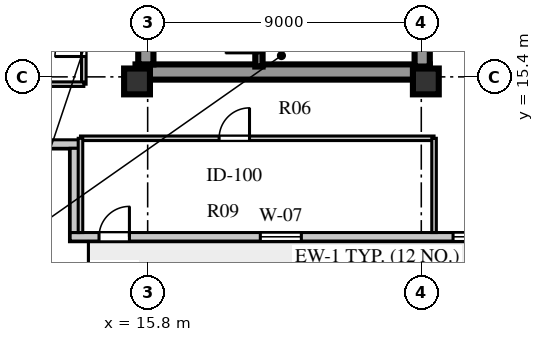
"""IFC4 building model, lengths in metres.
Left out: names, types, materials, properties, quantities, classifications, styles, units other than length and angle.
Written with IfcOpenShell. Run it as: python <this file> out.ifc"""

import sys

from ifc_helpers import new_model, si_unit, direction, frame, frame_2d, origin, origin_2d, place, context, subcontext, project, spatial, rectangle, extrude, element, fill, save


model = new_model("IFC4")
c1 = context("Model", 3, precision=1e-05, world=origin(), true_north=direction((0.0, 1.0)))
c2 = subcontext(c1, "Body", "Model", "MODEL_VIEW")
j1 = project(units=[si_unit("LENGTHUNIT", "METRE"), si_unit("PLANEANGLEUNIT", "RADIAN")], contexts=[c1])
p1 = place(None, origin())
s1 = spatial("IfcSite", under=j1, at=p1, CompositionType="ELEMENT")
p2 = place(p1, origin())
s2 = spatial("IfcBuilding", under=s1, at=p2, CompositionType="ELEMENT")
p3 = place(p2, frame((0.0, 0.0, 134.8)))
s3 = spatial("IfcBuildingStorey", under=s2, at=p3, CompositionType="ELEMENT", Elevation=134.8)
p4 = place(p3, frame((15.4, 15.56, 0.0), z_axis=(0.0, 0.0, 1.0), x_axis=(1.0, 0.0, 0.0)))
e1 = element("IfcWall", 1, at=p4, inside=s3, PredefinedType="SHEAR", context=c2, shape_type="SweptSolid", body=[
    extrude(rectangle(XDim=9.68, YDim=0.5, at=frame_2d((4.84, 0.0))), origin(), (0.0, 0.0, 1.0), 3.6),
])
p5 = place(p3, frame((15.74, 15.81, 0.0), z_axis=(0.0, 0.0, 1.0), x_axis=(0.0, 1.0, 0.0)))
e2 = element("IfcWall", 2, at=p5, inside=s3, PredefinedType="SHEAR", context=c2, shape_type="SweptSolid", body=[
    extrude(rectangle(XDim=25.63, YDim=0.5, at=frame_2d((12.815, 0.0))), origin(), (0.0, 0.0, 1.0), 3.6),
])
p6 = place(p3, frame((24.83, 15.74, 0.0), z_axis=(0.0, 0.0, 1.0), x_axis=(0.0, 1.0, 0.0)))
e3 = element("IfcWall", 3, at=p6, inside=s3, PredefinedType="SHEAR", context=c2, shape_type="SweptSolid", body=[
    extrude(rectangle(XDim=25.76, YDim=0.5, at=frame_2d((12.88, 0.0))), origin(), (0.0, 0.0, 1.0), 3.6),
])
p7 = place(p6, frame((1.61, 0.0, 0.0)))
e4 = element("IfcOpeningElement", 4, at=p7, cuts=e3, PredefinedType="OPENING", context=c2, shape_type="SweptSolid", body=[
    extrude(rectangle(XDim=1.2, YDim=2.1, at=frame_2d((0.6, 1.05))), frame((0.0, 0.26, 0.0), z_axis=(0.0, -1.0, 0.0), x_axis=(1.0, 0.0, 0.0)), (0.0, 0.0, 1.0), 0.52),
])
p8 = place(p6, frame((6.78, 0.0, 0.0)))
e5 = element("IfcOpeningElement", 5, at=p8, cuts=e3, PredefinedType="OPENING", context=c2, shape_type="SweptSolid", body=[
    extrude(rectangle(XDim=0.85, YDim=2.06, at=frame_2d((0.425, 1.03))), frame((0.0, 0.26, 0.0), z_axis=(0.0, -1.0, 0.0), x_axis=(1.0, 0.0, 0.0)), (0.0, 0.0, 1.0), 0.52),
])
p9 = place(p6, frame((12.11, 0.0, 0.0)))
e6 = element("IfcOpeningElement", 6, at=p9, cuts=e3, PredefinedType="OPENING", context=c2, shape_type="SweptSolid", body=[
    extrude(rectangle(XDim=1.5, YDim=2.12, at=frame_2d((0.75, 1.06))), frame((0.0, 0.26, 0.0), z_axis=(0.0, -1.0, 0.0), x_axis=(1.0, 0.0, 0.0)), (0.0, 0.0, 1.0), 0.52),
])
p10 = place(p6, frame((20.11, 0.0, 0.0)))
e7 = element("IfcOpeningElement", 7, at=p10, cuts=e3, PredefinedType="OPENING", context=c2, shape_type="SweptSolid", body=[
    extrude(rectangle(XDim=1.2, YDim=2.12, at=frame_2d((0.6, 1.06))), frame((0.0, 0.26, 0.0), z_axis=(0.0, -1.0, 0.0), x_axis=(1.0, 0.0, 0.0)), (0.0, 0.0, 1.0), 0.52),
])
p11 = place(p6, frame((24.01, 0.0, 0.0)))
e8 = element("IfcOpeningElement", 8, at=p11, cuts=e3, PredefinedType="OPENING", context=c2, shape_type="SweptSolid", body=[
    extrude(rectangle(XDim=0.95, YDim=2.1, at=frame_2d((0.475, 1.05))), frame((0.0, 0.26, 0.0), z_axis=(0.0, -1.0, 0.0), x_axis=(1.0, 0.0, 0.0)), (0.0, 0.0, 1.0), 0.52),
])
for number, where, z_axis, x_axis in (
    (9, (15.45, 15.25, 0.0), (0.0, 0.0, 1.0), (1.0, 0.0, 0.0)),
    (10, (24.95, 15.25, 0.0), (0.0, 0.0, 1.0), (1.0, 0.0, 0.0)),
):
    element("IfcColumn", number, at=place(p3, frame(where, z_axis=z_axis, x_axis=x_axis)), inside=s3, PredefinedType="COLUMN", context=c2, shape_type="SweptSolid", body=[
        extrude(rectangle(XDim=0.85, YDim=0.85, at=origin_2d()), origin(), (0.0, 0.0, 1.0), 3.6),
    ])
p12 = place(p3, frame((13.25, 10.14, 0.0), z_axis=(0.0, 0.0, 1.0), x_axis=(1.0, 0.0, 0.0)))
e11 = element("IfcWall", 11, at=p12, inside=s3, PredefinedType="STANDARD", context=c2, shape_type="SweptSolid", body=[
    extrude(rectangle(XDim=32.1, YDim=0.28, at=frame_2d((16.05, 0.0))), origin(), (0.0, 0.0, 1.0), 3.6),
])
p13 = place(p12, frame((0.95, 0.0, 0.0)))
e12 = element("IfcOpeningElement", 12, at=p13, cuts=e11, PredefinedType="OPENING", context=c2, shape_type="SweptSolid", body=[
    extrude(rectangle(XDim=1.0, YDim=2.05, at=frame_2d((0.5, 1.025))), frame((0.0, 0.15, 0.0), z_axis=(0.0, -1.0, 0.0), x_axis=(1.0, 0.0, 0.0)), (0.0, 0.0, 1.0), 0.3),
])
p14 = place(p12, frame((6.255, 0.0, 0.8)))
e13 = element("IfcOpeningElement", 13, at=p14, cuts=e11, PredefinedType="OPENING", context=c2, shape_type="SweptSolid", body=[
    extrude(rectangle(XDim=1.35, YDim=1.9, at=frame_2d((0.675, 0.95))), frame((0.0, 0.15, 0.0), z_axis=(0.0, -1.0, 0.0), x_axis=(1.0, 0.0, 0.0)), (0.0, 0.0, 1.0), 0.3),
])
p15 = place(p12, frame((12.595, 0.0, 0.8)))
e14 = element("IfcOpeningElement", 14, at=p15, cuts=e11, PredefinedType="OPENING", context=c2, shape_type="SweptSolid", body=[
    extrude(rectangle(XDim=1.2, YDim=1.75, at=frame_2d((0.6, 0.875))), frame((0.0, 0.15, 0.0), z_axis=(0.0, -1.0, 0.0), x_axis=(1.0, 0.0, 0.0)), (0.0, 0.0, 1.0), 0.3),
])
p16 = place(p12, frame((14.885, 0.0, 0.8)))
e15 = element("IfcOpeningElement", 15, at=p16, cuts=e11, PredefinedType="OPENING", context=c2, shape_type="SweptSolid", body=[
    extrude(rectangle(XDim=1.2, YDim=1.75, at=frame_2d((0.6, 0.875))), frame((0.0, 0.15, 0.0), z_axis=(0.0, -1.0, 0.0), x_axis=(1.0, 0.0, 0.0)), (0.0, 0.0, 1.0), 0.3),
])
p17 = place(p12, frame((17.16, 0.0, 0.8)))
e16 = element("IfcOpeningElement", 16, at=p17, cuts=e11, PredefinedType="OPENING", context=c2, shape_type="SweptSolid", body=[
    extrude(rectangle(XDim=2.25, YDim=2.0, at=frame_2d((1.125, 1.0))), frame((0.0, 0.15, 0.0), z_axis=(0.0, -1.0, 0.0), x_axis=(1.0, 0.0, 0.0)), (0.0, 0.0, 1.0), 0.3),
])
p18 = place(p12, frame((20.485, 0.0, 0.8)))
e17 = element("IfcOpeningElement", 17, at=p18, cuts=e11, PredefinedType="OPENING", context=c2, shape_type="SweptSolid", body=[
    extrude(rectangle(XDim=1.2, YDim=1.75, at=frame_2d((0.6, 0.875))), frame((0.0, 0.15, 0.0), z_axis=(0.0, -1.0, 0.0), x_axis=(1.0, 0.0, 0.0)), (0.0, 0.0, 1.0), 0.3),
])
p19 = place(p12, frame((23.005, 0.0, 0.8)))
e18 = element("IfcOpeningElement", 18, at=p19, cuts=e11, PredefinedType="OPENING", context=c2, shape_type="SweptSolid", body=[
    extrude(rectangle(XDim=1.5, YDim=2.0, at=frame_2d((0.75, 1.0))), frame((0.0, 0.15, 0.0), z_axis=(0.0, -1.0, 0.0), x_axis=(1.0, 0.0, 0.0)), (0.0, 0.0, 1.0), 0.3),
])
p20 = place(p12, frame((25.865, 0.0, 0.8)))
e19 = element("IfcOpeningElement", 19, at=p20, cuts=e11, PredefinedType="OPENING", context=c2, shape_type="SweptSolid", body=[
    extrude(rectangle(XDim=1.2, YDim=1.75, at=frame_2d((0.6, 0.875))), frame((0.0, 0.15, 0.0), z_axis=(0.0, -1.0, 0.0), x_axis=(1.0, 0.0, 0.0)), (0.0, 0.0, 1.0), 0.3),
])
p21 = place(p12, frame((28.58, 0.0, 0.8)))
e20 = element("IfcOpeningElement", 20, at=p21, cuts=e11, PredefinedType="OPENING", context=c2, shape_type="SweptSolid", body=[
    extrude(rectangle(XDim=2.4, YDim=2.05, at=frame_2d((1.2, 1.025))), frame((0.0, 0.15, 0.0), z_axis=(0.0, -1.0, 0.0), x_axis=(1.0, 0.0, 0.0)), (0.0, 0.0, 1.0), 0.3),
])
p22 = place(p3, frame((10.2, 13.19, 0.0), z_axis=(0.0, 0.0, 1.0), x_axis=(1.0, 0.0, 0.0)))
e21 = element("IfcWall", 21, at=p22, inside=s3, PredefinedType="STANDARD", context=c2, shape_type="SweptSolid", body=[
    extrude(rectangle(XDim=3.33, YDim=0.28, at=frame_2d((1.665, 0.0))), origin(), (0.0, 0.0, 1.0), 3.6),
])
p23 = place(p3, frame((13.39, 13.05, 0.0), z_axis=(0.0, 0.0, 1.0), x_axis=(0.0, -1.0, 0.0)))
e22 = element("IfcWall", 22, at=p23, inside=s3, PredefinedType="STANDARD", context=c2, shape_type="SweptSolid", body=[
    extrude(rectangle(XDim=2.77, YDim=0.28, at=frame_2d((1.385, 0.0))), origin(), (0.0, 0.0, 1.0), 3.6),
])
p24 = place(p3, frame((19.46, 15.74, 0.0), z_axis=(0.0, 0.0, 1.0), x_axis=(0.0, 1.0, 0.0)))
e23 = element("IfcWall", 23, at=p24, inside=s3, PredefinedType="SHEAR", context=c2, shape_type="SweptSolid", body=[
    extrude(rectangle(XDim=8.2, YDim=0.24, at=frame_2d((4.1, 0.0))), origin(), (0.0, 0.0, 1.0), 3.85),
])
p25 = place(p24, frame((0.45, 0.0, 0.0)))
e24 = element("IfcOpeningElement", 24, at=p25, cuts=e23, PredefinedType="OPENING", context=c2, shape_type="SweptSolid", body=[
    extrude(rectangle(XDim=1.1, YDim=2.1, at=frame_2d((0.55, 1.05))), frame((0.0, 0.13, 0.0), z_axis=(0.0, -1.0, 0.0), x_axis=(1.0, 0.0, 0.0)), (0.0, 0.0, 1.0), 0.26),
])
p26 = place(p3, frame((13.7, 15.16, 0.0), z_axis=(0.0, 0.0, 1.0), x_axis=(0.0, 1.0, 0.0)))
e25 = element("IfcWall", 25, at=p26, inside=s3, PredefinedType="PARTITIONING", context=c2, shape_type="SweptSolid", body=[
    extrude(rectangle(XDim=26.88, YDim=0.15, at=frame_2d((13.44, 0.0))), origin(), (0.0, 0.0, 1.0), 3.6),
])
p27 = place(p26, frame((0.91, 0.0, 0.0)))
e26 = element("IfcOpeningElement", 26, at=p27, cuts=e25, PredefinedType="OPENING", context=c2, shape_type="SweptSolid", body=[
    extrude(rectangle(XDim=0.95, YDim=2.1, at=frame_2d((0.475, 1.05))), frame((0.0, 0.085, 0.0), z_axis=(0.0, -1.0, 0.0), x_axis=(1.0, 0.0, 0.0)), (0.0, 0.0, 1.0), 0.17),
])
p28 = place(p26, frame((9.69, 0.0, 0.0)))
e27 = element("IfcOpeningElement", 27, at=p28, cuts=e25, PredefinedType="OPENING", context=c2, shape_type="SweptSolid", body=[
    extrude(rectangle(XDim=0.95, YDim=2.1, at=frame_2d((0.475, 1.05))), frame((0.0, 0.085, 0.0), z_axis=(0.0, -1.0, 0.0), x_axis=(1.0, 0.0, 0.0)), (0.0, 0.0, 1.0), 0.17),
])
p29 = place(p26, frame((18.49, 0.0, 0.0)))
e28 = element("IfcOpeningElement", 28, at=p29, cuts=e25, PredefinedType="OPENING", context=c2, shape_type="SweptSolid", body=[
    extrude(rectangle(XDim=0.95, YDim=2.1, at=frame_2d((0.475, 1.05))), frame((0.0, 0.085, 0.0), z_axis=(0.0, -1.0, 0.0), x_axis=(1.0, 0.0, 0.0)), (0.0, 0.0, 1.0), 0.17),
])
p30 = place(p3, frame((10.48, 15.16, 0.0), z_axis=(0.0, 0.0, 1.0), x_axis=(1.0, 0.0, 0.0)))
e29 = element("IfcWall", 29, at=p30, inside=s3, PredefinedType="PARTITIONING", context=c2, shape_type="SweptSolid", body=[
    extrude(rectangle(XDim=3.22, YDim=0.15, at=frame_2d((1.61, 0.0))), origin(), (0.0, 0.0, 1.0), 3.1),
])
p31 = place(p3, frame((13.59, 13.38, 0.0), z_axis=(0.0, 0.0, 1.0), x_axis=(1.0, 0.0, 0.0)))
e30 = element("IfcWall", 30, at=p31, inside=s3, PredefinedType="PARTITIONING", context=c2, shape_type="SweptSolid", body=[
    extrude(rectangle(XDim=11.63, YDim=0.15, at=frame_2d((5.815, 0.0))), origin(), (0.0, 0.0, 1.0), 3.6),
])
p32 = place(p31, frame((4.56, 0.0, 0.0)))
e31 = element("IfcOpeningElement", 31, at=p32, cuts=e30, PredefinedType="OPENING", context=c2, shape_type="SweptSolid", body=[
    extrude(rectangle(XDim=1.0, YDim=2.08, at=frame_2d((0.5, 1.04))), frame((0.0, 0.085, 0.0), z_axis=(0.0, -1.0, 0.0), x_axis=(1.0, 0.0, 0.0)), (0.0, 0.0, 1.0), 0.17),
])
p33 = place(p3, frame((13.59, 10.28, 0.0), z_axis=(0.0, 0.0, 1.0), x_axis=(0.0, 1.0, 0.0)))
e32 = element("IfcWall", 32, at=p33, inside=s3, PredefinedType="PARTITIONING", context=c2, shape_type="SweptSolid", body=[
    extrude(rectangle(XDim=3.1, YDim=0.15, at=frame_2d((1.55, 0.0))), origin(), (0.0, 0.0, 1.0), 3.6),
])
p34 = place(p3, frame((25.22, 10.28, 0.0), z_axis=(0.0, 0.0, 1.0), x_axis=(0.0, 1.0, 0.0)))
e33 = element("IfcWall", 33, at=p34, inside=s3, PredefinedType="PARTITIONING", context=c2, shape_type="SweptSolid", body=[
    extrude(rectangle(XDim=3.1, YDim=0.15, at=frame_2d((1.55, 0.0))), origin(), (0.0, 0.0, 1.0), 3.1),
])
p35 = place(p13, frame((1.0, 0.0, 0.0), z_axis=(0.0, 0.0, 1.0), x_axis=(-1.0, 0.0, 0.0)))
e34 = element("IfcDoor", 34, at=p35, inside=s3, OperationType="SINGLE_SWING_LEFT", PredefinedType="DOOR", context=c2, shape_type="SweptSolid", body=[
    extrude(rectangle(XDim=1.0, YDim=2.05, at=frame_2d((0.5, 1.025))), frame((0.0, 0.025, 0.0), z_axis=(0.0, -1.0, 0.0), x_axis=(1.0, 0.0, 0.0)), (0.0, 0.0, 1.0), 0.05),
])
fill(e12, e34)
p36 = place(p14, origin())
e35 = element("IfcWindow", 35, at=p36, inside=s3, PartitioningType="SINGLE_PANEL", PredefinedType="WINDOW", context=c2, shape_type="SweptSolid", body=[
    extrude(rectangle(XDim=1.35, YDim=1.9, at=frame_2d((0.675, 0.95))), frame((0.0, 0.03, 0.0), z_axis=(0.0, -1.0, 0.0), x_axis=(1.0, 0.0, 0.0)), (0.0, 0.0, 1.0), 0.06),
])
fill(e13, e35)
p37 = place(p15, origin())
e36 = element("IfcWindow", 36, at=p37, inside=s3, PartitioningType="SINGLE_PANEL", PredefinedType="WINDOW", context=c2, shape_type="SweptSolid", body=[
    extrude(rectangle(XDim=1.2, YDim=1.75, at=frame_2d((0.6, 0.875))), frame((0.0, 0.03, 0.0), z_axis=(0.0, -1.0, 0.0), x_axis=(1.0, 0.0, 0.0)), (0.0, 0.0, 1.0), 0.06),
])
fill(e14, e36)
p38 = place(p25, origin())
e37 = element("IfcDoor", 37, at=p38, inside=s3, OperationType="SINGLE_SWING_LEFT", PredefinedType="DOOR", context=c2, shape_type="SweptSolid", body=[
    extrude(rectangle(XDim=1.1, YDim=2.1, at=frame_2d((0.55, 1.05))), frame((0.0, 0.025, 0.0), z_axis=(0.0, -1.0, 0.0), x_axis=(1.0, 0.0, 0.0)), (0.0, 0.0, 1.0), 0.05),
])
fill(e24, e37)
p39 = place(p32, frame((1.0, 0.0, 0.0), z_axis=(0.0, 0.0, 1.0), x_axis=(-1.0, 0.0, 0.0)))
e38 = element("IfcDoor", 38, at=p39, inside=s3, OperationType="SINGLE_SWING_LEFT", PredefinedType="DOOR", context=c2, shape_type="SweptSolid", body=[
    extrude(rectangle(XDim=1.0, YDim=2.08, at=frame_2d((0.5, 1.04))), frame((0.0, 0.025, 0.0), z_axis=(0.0, -1.0, 0.0), x_axis=(1.0, 0.0, 0.0)), (0.0, 0.0, 1.0), 0.05),
])
fill(e31, e38)
p40 = place(p27, origin())
e39 = element("IfcDoor", 39, at=p40, inside=s3, OperationType="SINGLE_SWING_LEFT", PredefinedType="DOOR", context=c2, shape_type="SweptSolid", body=[
    extrude(rectangle(XDim=0.95, YDim=2.1, at=frame_2d((0.475, 1.05))), frame((0.0, 0.025, 0.0), z_axis=(0.0, -1.0, 0.0), x_axis=(1.0, 0.0, 0.0)), (0.0, 0.0, 1.0), 0.05),
])
fill(e26, e39)
save(model, sys.argv[1])
